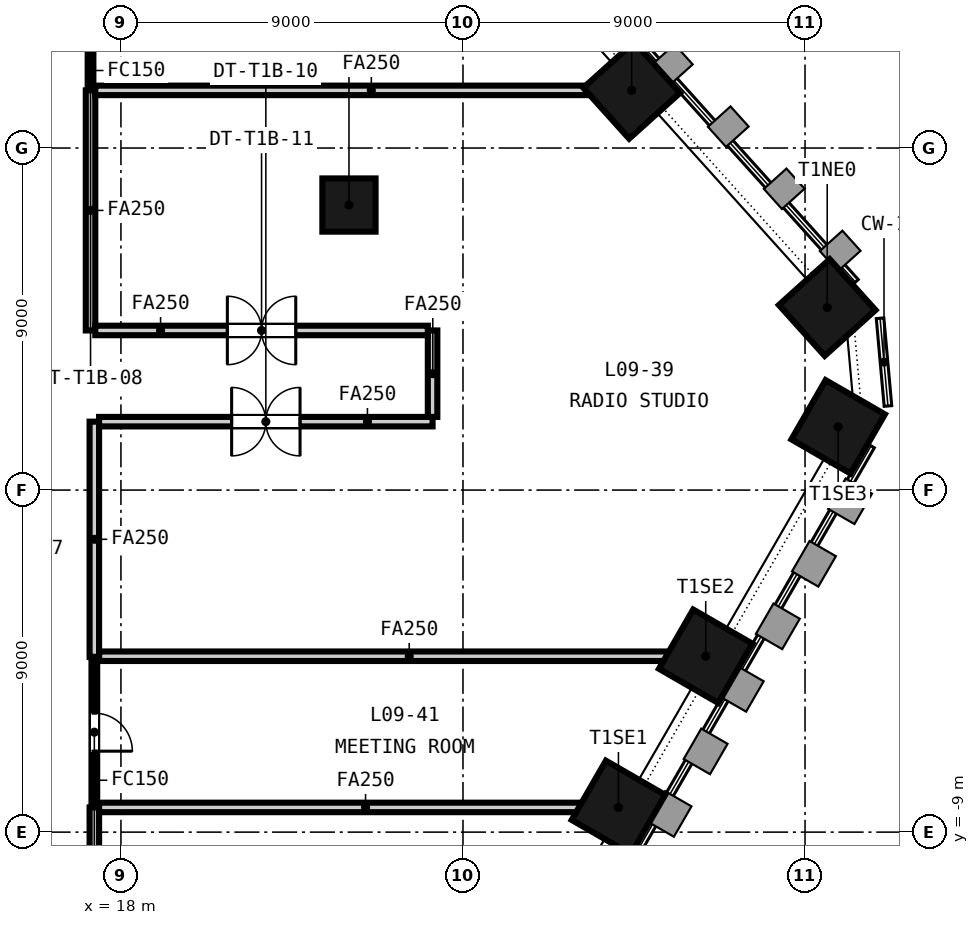
"""IFC4 building model, lengths in metres.
Left out: names, types, materials, properties, quantities, classifications, styles, units other than length and angle.
Written with IfcOpenShell. Run it as: python <this file> out.ifc"""

import sys

from ifc_helpers import new_model, si_unit, direction, frame, frame_2d, origin, origin_2d, place, context, subcontext, project, spatial, rectangle, extrude, element, fill, save


model = new_model("IFC4")
c1 = context("Model", 3, precision=1e-05, world=origin(), true_north=direction((0.0, 1.0)))
c2 = subcontext(c1, "Body", "Model", "MODEL_VIEW")
j1 = project(units=[si_unit("LENGTHUNIT", "METRE"), si_unit("PLANEANGLEUNIT", "RADIAN")], contexts=[c1])
p1 = place(None, origin())
s1 = spatial("IfcSite", under=j1, at=p1, CompositionType="ELEMENT")
p2 = place(p1, origin())
s2 = spatial("IfcBuilding", under=s1, at=p2, CompositionType="ELEMENT")
p3 = place(p2, frame((0.0, 0.0, 46.95)))
s3 = spatial("IfcBuildingStorey", under=s2, at=p3, CompositionType="ELEMENT", Elevation=46.95)
for number, where, z_axis, x_axis in (
    (1, (31.09, -8.35, -0.15), (0.0, 0.0, 1.0), (0.5, 0.866, 0.0)),
    (2, (33.387, -4.373, -0.15), (0.0, 0.0, 1.0), (0.5, 0.866, 0.0)),
    (3, (36.872, 1.663, -0.15), (0.0, 0.0, 1.0), (0.5, 0.866, 0.0)),
    (4, (36.584, 4.803, -0.15), (0.0, 0.0, 1.0), (-0.669, 0.743, 0.0)),
    (5, (31.438, 10.517, -0.15), (0.0, 0.0, 1.0), (-0.669, 0.743, 0.0)),
):
    element("IfcColumn", number, at=place(p3, frame(where, z_axis=z_axis, x_axis=x_axis)), inside=s3, PredefinedType="COLUMN", context=c2, shape_type="SweptSolid", body=[
        extrude(rectangle(XDim=1.8, YDim=1.8, at=origin_2d()), origin(), (0.0, 0.0, 1.0), 3.65),
    ])
p4 = place(p3, frame((24.0, 7.5, -0.15), z_axis=(0.0, 0.0, 1.0), x_axis=(1.0, 0.0, 0.0)))
e6 = element("IfcColumn", 6, at=p4, inside=s3, PredefinedType="COLUMN", context=c2, shape_type="SweptSolid", body=[
    extrude(rectangle(XDim=1.4, YDim=1.4, at=origin_2d()), origin(), (0.0, 0.0, 1.0), 3.65),
])
p5 = place(p3, frame((17.2, 13.709, 0.0), z_axis=(0.0, 0.0, 1.0), x_axis=(0.0, -1.0, 0.0)))
e7 = element("IfcWall", 7, at=p5, inside=s3, PredefinedType="PARTITIONING", context=c2, shape_type="SweptSolid", body=[
    extrude(rectangle(XDim=3.192, YDim=0.15, at=frame_2d((1.596, 0.0))), origin(), (0.0, 0.0, 1.0), 2.741),
])
p6 = place(p5, frame((1.096, 0.0, 0.0)))
e8 = element("IfcOpeningElement", 8, at=p6, cuts=e7, PredefinedType="OPENING", context=c2, shape_type="SweptSolid", body=[
    extrude(rectangle(XDim=1.0, YDim=2.1, at=frame_2d((0.5, 1.05))), frame((0.0, 0.085, 0.0), z_axis=(0.0, -1.0, 0.0), x_axis=(1.0, 0.0, 0.0)), (0.0, 0.0, 1.0), 0.17),
])
p7 = place(p3, frame((17.2, 10.517, 0.0), z_axis=(0.0, 0.0, 1.0), x_axis=(0.0, -1.0, 0.0)))
e9 = element("IfcWall", 9, at=p7, inside=s3, PredefinedType="PARTITIONING", context=c2, shape_type="SweptSolid", body=[
    extrude(rectangle(XDim=6.317, YDim=0.25, at=frame_2d((3.159, 0.0))), origin(), (0.0, 0.0, 1.0), 2.741),
])
p8 = place(p3, frame((17.3, 1.8, 0.0), z_axis=(0.0, 0.0, 1.0), x_axis=(0.0, -1.0, 0.0)))
e10 = element("IfcWall", 10, at=p8, inside=s3, PredefinedType="PARTITIONING", context=c2, shape_type="SweptSolid", body=[
    extrude(rectangle(XDim=6.19, YDim=0.25, at=frame_2d((3.095, 0.0))), origin(), (0.0, 0.0, 1.0), 2.741),
])
p9 = place(p3, frame((26.2, 1.8, 0.0), z_axis=(0.0, 0.0, 1.0), x_axis=(-1.0, 0.0, 0.0)))
e11 = element("IfcWall", 11, at=p9, inside=s3, PredefinedType="PARTITIONING", context=c2, shape_type="SweptSolid", body=[
    extrude(rectangle(XDim=8.775, YDim=0.25, at=frame_2d((4.387, 0.0))), origin(), (0.0, 0.0, 1.0), 2.741),
])
p10 = place(p9, frame((3.488, 0.0, 0.0)))
e12 = element("IfcOpeningElement", 12, at=p10, cuts=e11, PredefinedType="OPENING", context=c2, shape_type="SweptSolid", body=[
    extrude(rectangle(XDim=1.8, YDim=2.1, at=frame_2d((0.9, 1.05))), frame((0.0, 0.135, 0.0), z_axis=(0.0, -1.0, 0.0), x_axis=(1.0, 0.0, 0.0)), (0.0, 0.0, 1.0), 0.27),
])
p11 = place(p3, frame((26.2, 4.2, 0.0), z_axis=(0.0, 0.0, 1.0), x_axis=(0.0, -1.0, 0.0)))
e13 = element("IfcWall", 13, at=p11, inside=s3, PredefinedType="PARTITIONING", context=c2, shape_type="SweptSolid", body=[
    extrude(rectangle(XDim=2.275, YDim=0.25, at=frame_2d((1.137, 0.0))), origin(), (0.0, 0.0, 1.0), 2.741),
])
p12 = place(p3, frame((17.3, -4.39, 0.0), z_axis=(0.0, 0.0, 1.0), x_axis=(0.0, -1.0, 0.0)))
e14 = element("IfcWall", 14, at=p12, inside=s3, PredefinedType="PARTITIONING", context=c2, shape_type="SweptSolid", body=[
    extrude(rectangle(XDim=3.96, YDim=0.15, at=frame_2d((1.98, 0.0))), origin(), (0.0, 0.0, 1.0), 2.741),
])
p13 = place(p12, frame((1.48, 0.0, 0.0)))
e15 = element("IfcOpeningElement", 15, at=p13, cuts=e14, PredefinedType="OPENING", context=c2, shape_type="SweptSolid", body=[
    extrude(rectangle(XDim=1.0, YDim=2.1, at=frame_2d((0.5, 1.05))), frame((0.0, 0.085, 0.0), z_axis=(0.0, -1.0, 0.0), x_axis=(1.0, 0.0, 0.0)), (0.0, 0.0, 1.0), 0.17),
])
p14 = place(p3, frame((17.3, -8.35, 0.0), z_axis=(0.0, 0.0, 1.0), x_axis=(0.0, -1.0, 0.0)))
e16 = element("IfcWall", 16, at=p14, inside=s3, PredefinedType="PARTITIONING", context=c2, shape_type="SweptSolid", body=[
    extrude(rectangle(XDim=3.925, YDim=0.25, at=frame_2d((1.962, 0.0))), origin(), (0.0, 0.0, 1.0), 2.741),
])
p15 = place(p3, frame((17.325, 10.517, 0.0), z_axis=(0.0, 0.0, 1.0), x_axis=(1.0, 0.0, 0.0)))
e17 = element("IfcWall", 17, at=p15, inside=s3, PredefinedType="PARTITIONING", context=c2, shape_type="SweptSolid", body=[
    extrude(rectangle(XDim=14.517, YDim=0.25, at=frame_2d((7.259, 0.0))), origin(), (0.0, 0.0, 1.0), 2.741),
])
p16 = place(p3, frame((17.325, 4.2, 0.0), z_axis=(0.0, 0.0, 1.0), x_axis=(1.0, 0.0, 0.0)))
e18 = element("IfcWall", 18, at=p16, inside=s3, PredefinedType="PARTITIONING", context=c2, shape_type="SweptSolid", body=[
    extrude(rectangle(XDim=8.75, YDim=0.25, at=frame_2d((4.375, 0.0))), origin(), (0.0, 0.0, 1.0), 2.741),
])
p17 = place(p16, frame((3.475, 0.0, 0.0)))
e19 = element("IfcOpeningElement", 19, at=p17, cuts=e18, PredefinedType="OPENING", context=c2, shape_type="SweptSolid", body=[
    extrude(rectangle(XDim=1.8, YDim=2.1, at=frame_2d((0.9, 1.05))), frame((0.0, 0.135, 0.0), z_axis=(0.0, -1.0, 0.0), x_axis=(1.0, 0.0, 0.0)), (0.0, 0.0, 1.0), 0.27),
])
p18 = place(p3, frame((17.427, -4.372, 0.0), z_axis=(0.0, 0.0, 1.0), x_axis=(1.0, 0.0, 0.0)))
e20 = element("IfcWall", 20, at=p18, inside=s3, PredefinedType="PARTITIONING", context=c2, shape_type="SweptSolid", body=[
    extrude(rectangle(XDim=16.306, YDim=0.25, at=frame_2d((8.153, 0.0))), origin(), (0.0, 0.0, 1.0), 2.741),
])
p19 = place(p3, frame((17.425, -8.35, 0.0), z_axis=(0.0, 0.0, 1.0), x_axis=(1.0, 0.0, 0.0)))
e21 = element("IfcWall", 21, at=p19, inside=s3, PredefinedType="PARTITIONING", context=c2, shape_type="SweptSolid", body=[
    extrude(rectangle(XDim=14.012, YDim=0.25, at=frame_2d((7.006, 0.0))), origin(), (0.0, 0.0, 1.0), 2.741),
])
p20 = place(p10, origin())
e22 = element("IfcDoor", 22, at=p20, inside=s3, OperationType="DOUBLE_DOOR_DOUBLE_SWING", PredefinedType="DOOR", context=c2, shape_type="SweptSolid", body=[
    extrude(rectangle(XDim=1.8, YDim=2.1, at=frame_2d((0.9, 1.05))), frame((0.0, 0.025, 0.0), z_axis=(0.0, -1.0, 0.0), x_axis=(1.0, 0.0, 0.0)), (0.0, 0.0, 1.0), 0.05),
])
fill(e12, e22)
p21 = place(p17, origin())
e23 = element("IfcDoor", 23, at=p21, inside=s3, OperationType="DOUBLE_DOOR_DOUBLE_SWING", PredefinedType="DOOR", context=c2, shape_type="SweptSolid", body=[
    extrude(rectangle(XDim=1.8, YDim=2.1, at=frame_2d((0.9, 1.05))), frame((0.0, 0.025, 0.0), z_axis=(0.0, -1.0, 0.0), x_axis=(1.0, 0.0, 0.0)), (0.0, 0.0, 1.0), 0.05),
])
fill(e19, e23)
p22 = place(p13, origin())
e24 = element("IfcDoor", 24, at=p22, inside=s3, OperationType="SINGLE_SWING_RIGHT", PredefinedType="DOOR", context=c2, shape_type="SweptSolid", body=[
    extrude(rectangle(XDim=1.0, YDim=2.1, at=frame_2d((0.5, 1.05))), frame((0.0, 0.025, 0.0), z_axis=(0.0, -1.0, 0.0), x_axis=(1.0, 0.0, 0.0)), (0.0, 0.0, 1.0), 0.05),
])
fill(e15, e24)
save(model, sys.argv[1])
